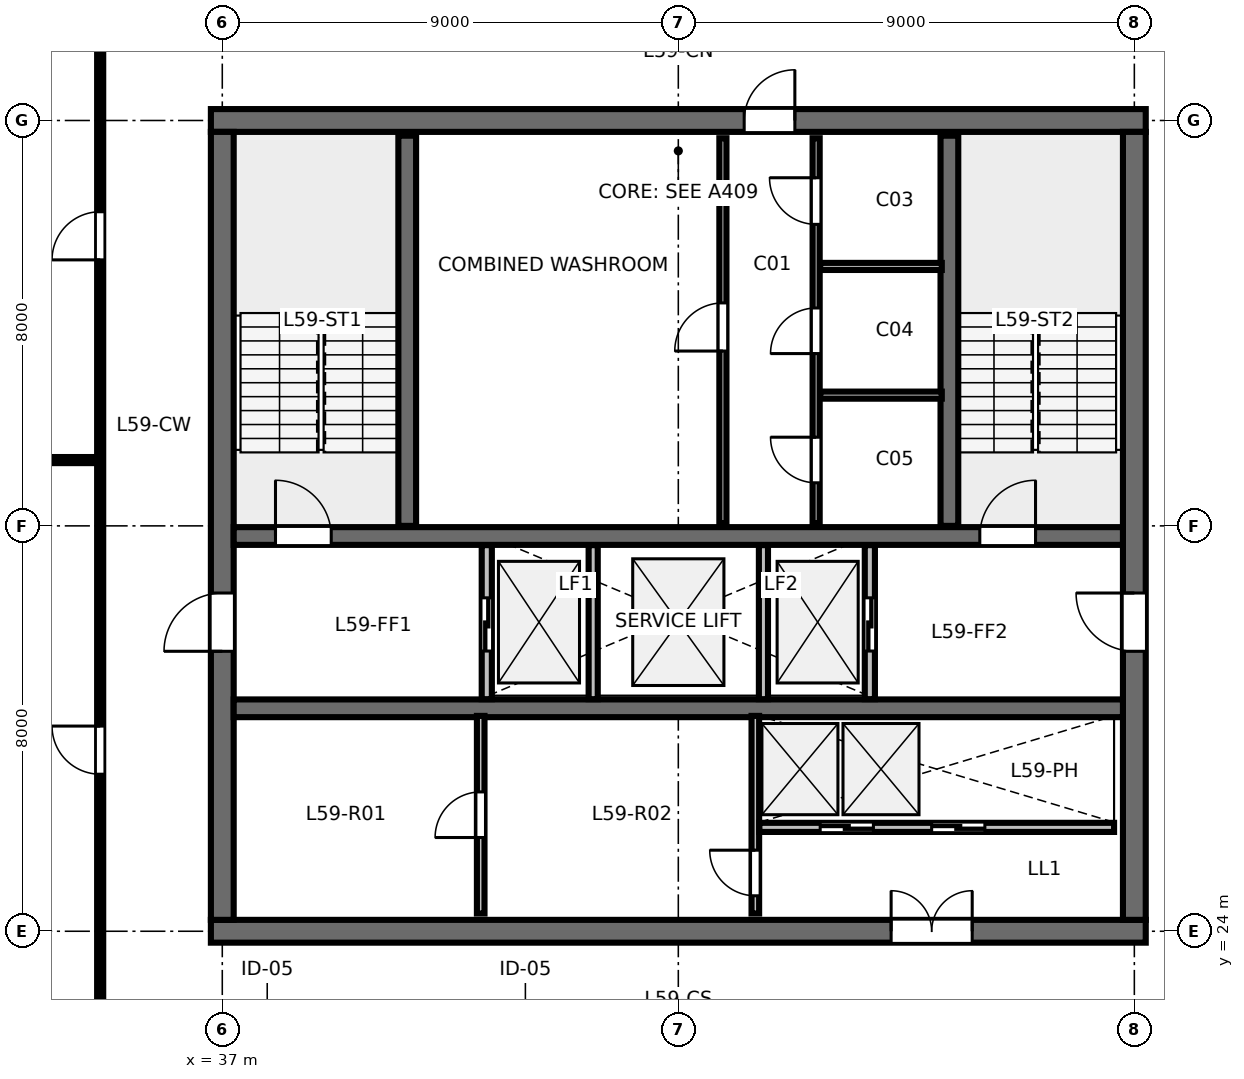
"""IFC4 building model, lengths in metres.
Left out: names, types, materials, properties, quantities, classifications, styles, units other than length and angle.
Written with IfcOpenShell. Run it as: python <this file> out.ifc"""

import sys

from ifc_helpers import new_model, si_unit, direction, frame, frame_2d, origin, place, context, subcontext, project, spatial, rectangle, extrude, element, fill, save


model = new_model("IFC4")
c1 = context("Model", 3, precision=1e-05, world=origin(), true_north=direction((0.0, 1.0)))
c2 = subcontext(c1, "Body", "Model", "MODEL_VIEW")
j1 = project(units=[si_unit("LENGTHUNIT", "METRE"), si_unit("PLANEANGLEUNIT", "RADIAN")], contexts=[c1])
p1 = place(None, origin())
s1 = spatial("IfcSite", under=j1, at=p1, CompositionType="ELEMENT")
p2 = place(p1, origin())
s2 = spatial("IfcBuilding", under=s1, at=p2, CompositionType="ELEMENT")
p3 = place(p2, frame((0.0, 0.0, 223.8)))
s3 = spatial("IfcBuildingStorey", under=s2, at=p3, CompositionType="ELEMENT", Elevation=223.8)
p4 = place(p3, frame((36.775, 24.0, 0.0), z_axis=(0.0, 0.0, 1.0), x_axis=(1.0, 0.0, 0.0)))
e1 = element("IfcWall", 1, at=p4, inside=s3, PredefinedType="SHEAR", context=c2, shape_type="SweptSolid", body=[
    extrude(rectangle(XDim=18.45, YDim=0.45, at=frame_2d((9.225, 0.0))), origin(), (0.0, 0.0, 1.0), 3.36),
])
p5 = place(p4, frame((13.425, 0.0, 0.0)))
e2 = element("IfcOpeningElement", 2, at=p5, cuts=e1, PredefinedType="OPENING", context=c2, shape_type="SweptSolid", body=[
    extrude(rectangle(XDim=1.6, YDim=2.15, at=frame_2d((0.8, 1.075))), frame((0.0, 0.235, 0.0), z_axis=(0.0, -1.0, 0.0), x_axis=(1.0, 0.0, 0.0)), (0.0, 0.0, 1.0), 0.47),
])
p6 = place(p3, frame((36.775, 40.0, 0.0), z_axis=(0.0, 0.0, 1.0), x_axis=(1.0, 0.0, 0.0)))
e3 = element("IfcWall", 3, at=p6, inside=s3, PredefinedType="SHEAR", context=c2, shape_type="SweptSolid", body=[
    extrude(rectangle(XDim=18.45, YDim=0.45, at=frame_2d((9.225, 0.0))), origin(), (0.0, 0.0, 1.0), 3.36),
])
p7 = place(p6, frame((10.525, 0.0, 0.0)))
e4 = element("IfcOpeningElement", 4, at=p7, cuts=e3, PredefinedType="OPENING", context=c2, shape_type="SweptSolid", body=[
    extrude(rectangle(XDim=1.0, YDim=2.15, at=frame_2d((0.5, 1.075))), frame((0.0, 0.235, 0.0), z_axis=(0.0, -1.0, 0.0), x_axis=(1.0, 0.0, 0.0)), (0.0, 0.0, 1.0), 0.47),
])
p8 = place(p3, frame((37.0, 24.225, 0.0), z_axis=(0.0, 0.0, 1.0), x_axis=(0.0, 1.0, 0.0)))
e5 = element("IfcWall", 5, at=p8, inside=s3, PredefinedType="SHEAR", context=c2, shape_type="SweptSolid", body=[
    extrude(rectangle(XDim=15.55, YDim=0.45, at=frame_2d((7.775, 0.0))), origin(), (0.0, 0.0, 1.0), 3.36),
])
p9 = place(p8, frame((5.3, 0.0, 0.0)))
e6 = element("IfcOpeningElement", 6, at=p9, cuts=e5, PredefinedType="OPENING", context=c2, shape_type="SweptSolid", body=[
    extrude(rectangle(XDim=1.15, YDim=2.15, at=frame_2d((0.575, 1.075))), frame((0.0, 0.235, 0.0), z_axis=(0.0, -1.0, 0.0), x_axis=(1.0, 0.0, 0.0)), (0.0, 0.0, 1.0), 0.47),
])
p10 = place(p3, frame((55.0, 24.225, 0.0), z_axis=(0.0, 0.0, 1.0), x_axis=(0.0, 1.0, 0.0)))
e7 = element("IfcWall", 7, at=p10, inside=s3, PredefinedType="SHEAR", context=c2, shape_type="SweptSolid", body=[
    extrude(rectangle(XDim=15.55, YDim=0.45, at=frame_2d((7.775, 0.0))), origin(), (0.0, 0.0, 1.0), 3.36),
])
p11 = place(p10, frame((5.3, 0.0, 0.0)))
e8 = element("IfcOpeningElement", 8, at=p11, cuts=e7, PredefinedType="OPENING", context=c2, shape_type="SweptSolid", body=[
    extrude(rectangle(XDim=1.15, YDim=2.15, at=frame_2d((0.575, 1.075))), frame((0.0, 0.235, 0.0), z_axis=(0.0, -1.0, 0.0), x_axis=(1.0, 0.0, 0.0)), (0.0, 0.0, 1.0), 0.47),
])
p12 = place(p3, frame((37.225, 31.8, 0.0), z_axis=(0.0, 0.0, 1.0), x_axis=(1.0, 0.0, 0.0)))
e9 = element("IfcWall", 9, at=p12, inside=s3, PredefinedType="SHEAR", context=c2, shape_type="SweptSolid", body=[
    extrude(rectangle(XDim=17.55, YDim=0.35, at=frame_2d((8.775, 0.0))), origin(), (0.0, 0.0, 1.0), 3.36),
])
p13 = place(p12, frame((0.825, 0.0, 0.0)))
e10 = element("IfcOpeningElement", 10, at=p13, cuts=e9, PredefinedType="OPENING", context=c2, shape_type="SweptSolid", body=[
    extrude(rectangle(XDim=1.1, YDim=2.15, at=frame_2d((0.55, 1.075))), frame((0.0, 0.185, 0.0), z_axis=(0.0, -1.0, 0.0), x_axis=(1.0, 0.0, 0.0)), (0.0, 0.0, 1.0), 0.37),
])
p14 = place(p12, frame((14.725, 0.0, 0.0)))
e11 = element("IfcOpeningElement", 11, at=p14, cuts=e9, PredefinedType="OPENING", context=c2, shape_type="SweptSolid", body=[
    extrude(rectangle(XDim=1.1, YDim=2.15, at=frame_2d((0.55, 1.075))), frame((0.0, 0.185, 0.0), z_axis=(0.0, -1.0, 0.0), x_axis=(1.0, 0.0, 0.0)), (0.0, 0.0, 1.0), 0.37),
])
p15 = place(p3, frame((37.225, 28.4, 0.0), z_axis=(0.0, 0.0, 1.0), x_axis=(1.0, 0.0, 0.0)))
e12 = element("IfcWall", 12, at=p15, inside=s3, PredefinedType="SHEAR", context=c2, shape_type="SweptSolid", body=[
    extrude(rectangle(XDim=17.55, YDim=0.35, at=frame_2d((8.775, 0.0))), origin(), (0.0, 0.0, 1.0), 3.36),
])
for number, where, z_axis, x_axis in (
    (13, (40.65, 32.0, 0.0), (0.0, 0.0, 1.0), (0.0, 1.0, 0.0)),
    (14, (51.35, 32.0, 0.0), (0.0, 0.0, 1.0), (0.0, 1.0, 0.0)),
):
    element("IfcWall", number, at=place(p3, frame(where, z_axis=z_axis, x_axis=x_axis)), inside=s3, PredefinedType="SHEAR", context=c2, shape_type="SweptSolid", body=[
        extrude(rectangle(XDim=7.7, YDim=0.35, at=frame_2d((3.85, 0.0))), origin(), (0.0, 0.0, 1.0), 3.6),
    ])
p16 = place(p3, frame((46.88, 32.05, 0.0), z_axis=(0.0, 0.0, 1.0), x_axis=(0.0, 1.0, 0.0)))
e15 = element("IfcWall", 15, at=p16, inside=s3, PredefinedType="PARTITIONING", context=c2, shape_type="SweptSolid", body=[
    extrude(rectangle(XDim=7.6, YDim=0.14, at=frame_2d((3.8, 0.0))), origin(), (0.0, 0.0, 1.0), 3.375),
])
p17 = place(p16, frame((3.4, 0.0, 0.0)))
e16 = element("IfcOpeningElement", 16, at=p17, cuts=e15, PredefinedType="OPENING", context=c2, shape_type="SweptSolid", body=[
    extrude(rectangle(XDim=0.95, YDim=2.15, at=frame_2d((0.475, 1.075))), frame((0.0, 0.08, 0.0), z_axis=(0.0, -1.0, 0.0), x_axis=(1.0, 0.0, 0.0)), (0.0, 0.0, 1.0), 0.16),
])
p18 = place(p3, frame((48.72, 32.05, 0.0), z_axis=(0.0, 0.0, 1.0), x_axis=(0.0, 1.0, 0.0)))
e17 = element("IfcWall", 17, at=p18, inside=s3, PredefinedType="PARTITIONING", context=c2, shape_type="SweptSolid", body=[
    extrude(rectangle(XDim=7.6, YDim=0.14, at=frame_2d((3.8, 0.0))), origin(), (0.0, 0.0, 1.0), 3.375),
])
p19 = place(p18, frame((0.8, 0.0, 0.0)))
e18 = element("IfcOpeningElement", 18, at=p19, cuts=e17, PredefinedType="OPENING", context=c2, shape_type="SweptSolid", body=[
    extrude(rectangle(XDim=0.9, YDim=2.15, at=frame_2d((0.45, 1.075))), frame((0.0, 0.08, 0.0), z_axis=(0.0, -1.0, 0.0), x_axis=(1.0, 0.0, 0.0)), (0.0, 0.0, 1.0), 0.16),
])
p20 = place(p18, frame((3.35, 0.0, 0.0)))
e19 = element("IfcOpeningElement", 19, at=p20, cuts=e17, PredefinedType="OPENING", context=c2, shape_type="SweptSolid", body=[
    extrude(rectangle(XDim=0.9, YDim=2.15, at=frame_2d((0.45, 1.075))), frame((0.0, 0.08, 0.0), z_axis=(0.0, -1.0, 0.0), x_axis=(1.0, 0.0, 0.0)), (0.0, 0.0, 1.0), 0.16),
])
p21 = place(p18, frame((5.9, 0.0, 0.0)))
e20 = element("IfcOpeningElement", 20, at=p21, cuts=e17, PredefinedType="OPENING", context=c2, shape_type="SweptSolid", body=[
    extrude(rectangle(XDim=0.92, YDim=2.15, at=frame_2d((0.46, 1.075))), frame((0.0, 0.08, 0.0), z_axis=(0.0, -1.0, 0.0), x_axis=(1.0, 0.0, 0.0)), (0.0, 0.0, 1.0), 0.16),
])
for number, where, z_axis, x_axis in (
    (21, (48.8, 34.58, 0.0), (0.0, 0.0, 1.0), (1.0, 0.0, 0.0)),
    (22, (48.8, 37.12, 0.0), (0.0, 0.0, 1.0), (1.0, 0.0, 0.0)),
):
    element("IfcWall", number, at=place(p3, frame(where, z_axis=z_axis, x_axis=x_axis)), inside=s3, PredefinedType="PARTITIONING", context=c2, shape_type="SweptSolid", body=[
        extrude(rectangle(XDim=2.4, YDim=0.14, at=frame_2d((1.2, 0.0))), origin(), (0.0, 0.0, 1.0), 3.375),
    ])
p22 = place(p3, frame((42.22, 28.58, 0.0), z_axis=(0.0, 0.0, 1.0), x_axis=(0.0, 1.0, 0.0)))
e23 = element("IfcWall", 23, at=p22, inside=s3, PredefinedType="PARTITIONING", context=c2, shape_type="SweptSolid", body=[
    extrude(rectangle(XDim=3.04, YDim=0.2, at=frame_2d((1.52, 0.0))), origin(), (0.0, 0.0, 1.0), 3.375),
])
p23 = place(p22, frame((0.95, 0.0, 0.0)))
e24 = element("IfcOpeningElement", 24, at=p23, cuts=e23, PredefinedType="OPENING", context=c2, shape_type="SweptSolid", body=[
    extrude(rectangle(XDim=1.05, YDim=2.15, at=frame_2d((0.525, 1.075))), frame((0.0, 0.11, 0.0), z_axis=(0.0, -1.0, 0.0), x_axis=(1.0, 0.0, 0.0)), (0.0, 0.0, 1.0), 0.22),
])
p24 = place(p3, frame((49.78, 28.58, 0.0), z_axis=(0.0, 0.0, 1.0), x_axis=(0.0, 1.0, 0.0)))
e25 = element("IfcWall", 25, at=p24, inside=s3, PredefinedType="PARTITIONING", context=c2, shape_type="SweptSolid", body=[
    extrude(rectangle(XDim=3.04, YDim=0.2, at=frame_2d((1.52, 0.0))), origin(), (0.0, 0.0, 1.0), 3.375),
])
p25 = place(p24, frame((0.95, 0.0, 0.0)))
e26 = element("IfcOpeningElement", 26, at=p25, cuts=e25, PredefinedType="OPENING", context=c2, shape_type="SweptSolid", body=[
    extrude(rectangle(XDim=1.05, YDim=2.15, at=frame_2d((0.525, 1.075))), frame((0.0, 0.11, 0.0), z_axis=(0.0, -1.0, 0.0), x_axis=(1.0, 0.0, 0.0)), (0.0, 0.0, 1.0), 0.22),
])
for number, where, z_axis, x_axis in (
    (27, (44.32, 28.58, 0.0), (0.0, 0.0, 1.0), (0.0, 1.0, 0.0)),
    (28, (47.68, 28.58, 0.0), (0.0, 0.0, 1.0), (0.0, 1.0, 0.0)),
):
    element("IfcWall", number, at=place(p3, frame(where, z_axis=z_axis, x_axis=x_axis)), inside=s3, PredefinedType="PARTITIONING", context=c2, shape_type="SweptSolid", body=[
        extrude(rectangle(XDim=3.04, YDim=0.18, at=frame_2d((1.52, 0.0))), origin(), (0.0, 0.0, 1.0), 3.375),
    ])
p26 = place(p3, frame((42.1, 24.35, 0.0), z_axis=(0.0, 0.0, 1.0), x_axis=(0.0, 1.0, 0.0)))
e29 = element("IfcWall", 29, at=p26, inside=s3, PredefinedType="PARTITIONING", context=c2, shape_type="SweptSolid", body=[
    extrude(rectangle(XDim=3.9, YDim=0.15, at=frame_2d((1.95, 0.0))), origin(), (0.0, 0.0, 1.0), 3.375),
])
p27 = place(p26, frame((1.5, 0.0, 0.0)))
e30 = element("IfcOpeningElement", 30, at=p27, cuts=e29, PredefinedType="OPENING", context=c2, shape_type="SweptSolid", body=[
    extrude(rectangle(XDim=0.9, YDim=2.15, at=frame_2d((0.45, 1.075))), frame((0.0, 0.085, 0.0), z_axis=(0.0, -1.0, 0.0), x_axis=(1.0, 0.0, 0.0)), (0.0, 0.0, 1.0), 0.17),
])
p28 = place(p3, frame((47.52, 24.35, 0.0), z_axis=(0.0, 0.0, 1.0), x_axis=(0.0, 1.0, 0.0)))
e31 = element("IfcWall", 31, at=p28, inside=s3, PredefinedType="PARTITIONING", context=c2, shape_type="SweptSolid", body=[
    extrude(rectangle(XDim=3.9, YDim=0.15, at=frame_2d((1.95, 0.0))), origin(), (0.0, 0.0, 1.0), 3.375),
])
p29 = place(p28, frame((0.35, 0.0, 0.0)))
e32 = element("IfcOpeningElement", 32, at=p29, cuts=e31, PredefinedType="OPENING", context=c2, shape_type="SweptSolid", body=[
    extrude(rectangle(XDim=0.9, YDim=2.15, at=frame_2d((0.45, 1.075))), frame((0.0, 0.085, 0.0), z_axis=(0.0, -1.0, 0.0), x_axis=(1.0, 0.0, 0.0)), (0.0, 0.0, 1.0), 0.17),
])
p30 = place(p3, frame((47.6, 26.05, 0.0), z_axis=(0.0, 0.0, 1.0), x_axis=(1.0, 0.0, 0.0)))
e33 = element("IfcWall", 33, at=p30, inside=s3, PredefinedType="PARTITIONING", context=c2, shape_type="SweptSolid", body=[
    extrude(rectangle(XDim=7.0, YDim=0.18, at=frame_2d((3.5, 0.0))), origin(), (0.0, 0.0, 1.0), 3.375),
])
p31 = place(p30, frame((1.2, 0.0, 0.0)))
e34 = element("IfcOpeningElement", 34, at=p31, cuts=e33, PredefinedType="OPENING", context=c2, shape_type="SweptSolid", body=[
    extrude(rectangle(XDim=1.05, YDim=2.15, at=frame_2d((0.525, 1.075))), frame((0.0, 0.1, 0.0), z_axis=(0.0, -1.0, 0.0), x_axis=(1.0, 0.0, 0.0)), (0.0, 0.0, 1.0), 0.2),
])
p32 = place(p30, frame((3.4, 0.0, 0.0)))
e35 = element("IfcOpeningElement", 35, at=p32, cuts=e33, PredefinedType="OPENING", context=c2, shape_type="SweptSolid", body=[
    extrude(rectangle(XDim=1.05, YDim=2.15, at=frame_2d((0.525, 1.075))), frame((0.0, 0.1, 0.0), z_axis=(0.0, -1.0, 0.0), x_axis=(1.0, 0.0, 0.0)), (0.0, 0.0, 1.0), 0.2),
])
p33 = place(p3, frame((34.59, 33.299, 0.0), z_axis=(0.0, 0.0, 1.0), x_axis=(-1.0, 0.0, 0.0)))
e36 = element("IfcWall", 36, at=p33, inside=s3, PredefinedType="PARTITIONING", context=c2, shape_type="SweptSolid", body=[
    extrude(rectangle(XDim=8.183, YDim=0.12, at=frame_2d((4.091, 0.0))), origin(), (0.0, 0.0, 1.0), 2.655),
])
p34 = place(p33, frame((1.4, 0.0, 0.0)))
e37 = element("IfcOpeningElement", 37, at=p34, cuts=e36, PredefinedType="OPENING", context=c2, shape_type="SweptSolid", body=[
    extrude(rectangle(XDim=0.9, YDim=2.15, at=frame_2d((0.45, 1.075))), frame((0.0, 0.07, 0.0), z_axis=(0.0, -1.0, 0.0), x_axis=(1.0, 0.0, 0.0)), (0.0, 0.0, 1.0), 0.14),
])
p35 = place(p3, frame((34.59, 21.65, 0.0), z_axis=(0.0, 0.0, 1.0), x_axis=(0.0, 1.0, 0.0)))
e38 = element("IfcWall", 38, at=p35, inside=s3, PredefinedType="PARTITIONING", context=c2, shape_type="SweptSolid", body=[
    extrude(rectangle(XDim=20.7, YDim=0.12, at=frame_2d((10.35, 0.0))), origin(), (0.0, 0.0, 1.0), 2.655),
])
p36 = place(p35, frame((5.449, 0.0, 0.0)))
e39 = element("IfcOpeningElement", 39, at=p36, cuts=e38, PredefinedType="OPENING", context=c2, shape_type="SweptSolid", body=[
    extrude(rectangle(XDim=0.95, YDim=2.15, at=frame_2d((0.475, 1.075))), frame((0.0, 0.07, 0.0), z_axis=(0.0, -1.0, 0.0), x_axis=(1.0, 0.0, 0.0)), (0.0, 0.0, 1.0), 0.14),
])
p37 = place(p35, frame((15.599, 0.0, 0.0)))
e40 = element("IfcOpeningElement", 40, at=p37, cuts=e38, PredefinedType="OPENING", context=c2, shape_type="SweptSolid", body=[
    extrude(rectangle(XDim=0.95, YDim=2.15, at=frame_2d((0.475, 1.075))), frame((0.0, 0.07, 0.0), z_axis=(0.0, -1.0, 0.0), x_axis=(1.0, 0.0, 0.0)), (0.0, 0.0, 1.0), 0.14),
])
p38 = place(p13, origin())
e41 = element("IfcDoor", 41, at=p38, inside=s3, OperationType="SINGLE_SWING_LEFT", PredefinedType="DOOR", context=c2, shape_type="SweptSolid", body=[
    extrude(rectangle(XDim=1.1, YDim=2.15, at=frame_2d((0.55, 1.075))), frame((0.0, 0.025, 0.0), z_axis=(0.0, -1.0, 0.0), x_axis=(1.0, 0.0, 0.0)), (0.0, 0.0, 1.0), 0.05),
])
fill(e10, e41)
p39 = place(p14, origin())
e42 = element("IfcDoor", 42, at=p39, inside=s3, OperationType="SINGLE_SWING_RIGHT", PredefinedType="DOOR", context=c2, shape_type="SweptSolid", body=[
    extrude(rectangle(XDim=1.1, YDim=2.15, at=frame_2d((0.55, 1.075))), frame((0.0, 0.025, 0.0), z_axis=(0.0, -1.0, 0.0), x_axis=(1.0, 0.0, 0.0)), (0.0, 0.0, 1.0), 0.05),
])
fill(e11, e42)
p40 = place(p7, origin())
e43 = element("IfcDoor", 43, at=p40, inside=s3, OperationType="SINGLE_SWING_RIGHT", PredefinedType="DOOR", context=c2, shape_type="SweptSolid", body=[
    extrude(rectangle(XDim=1.0, YDim=2.15, at=frame_2d((0.5, 1.075))), frame((0.0, 0.025, 0.0), z_axis=(0.0, -1.0, 0.0), x_axis=(1.0, 0.0, 0.0)), (0.0, 0.0, 1.0), 0.05),
])
fill(e4, e43)
p41 = place(p9, origin())
e44 = element("IfcDoor", 44, at=p41, inside=s3, OperationType="SINGLE_SWING_LEFT", PredefinedType="DOOR", context=c2, shape_type="SweptSolid", body=[
    extrude(rectangle(XDim=1.15, YDim=2.15, at=frame_2d((0.575, 1.075))), frame((0.0, 0.025, 0.0), z_axis=(0.0, -1.0, 0.0), x_axis=(1.0, 0.0, 0.0)), (0.0, 0.0, 1.0), 0.05),
])
fill(e6, e44)
p42 = place(p11, origin())
e45 = element("IfcDoor", 45, at=p42, inside=s3, OperationType="SINGLE_SWING_RIGHT", PredefinedType="DOOR", context=c2, shape_type="SweptSolid", body=[
    extrude(rectangle(XDim=1.15, YDim=2.15, at=frame_2d((0.575, 1.075))), frame((0.0, 0.025, 0.0), z_axis=(0.0, -1.0, 0.0), x_axis=(1.0, 0.0, 0.0)), (0.0, 0.0, 1.0), 0.05),
])
fill(e8, e45)
p43 = place(p5, origin())
e46 = element("IfcDoor", 46, at=p43, inside=s3, OperationType="DOUBLE_DOOR_SINGLE_SWING", PredefinedType="DOOR", context=c2, shape_type="SweptSolid", body=[
    extrude(rectangle(XDim=1.6, YDim=2.15, at=frame_2d((0.8, 1.075))), frame((0.0, 0.025, 0.0), z_axis=(0.0, -1.0, 0.0), x_axis=(1.0, 0.0, 0.0)), (0.0, 0.0, 1.0), 0.05),
])
fill(e2, e46)
p44 = place(p17, origin())
e47 = element("IfcDoor", 47, at=p44, inside=s3, OperationType="SINGLE_SWING_LEFT", PredefinedType="DOOR", context=c2, shape_type="SweptSolid", body=[
    extrude(rectangle(XDim=0.95, YDim=2.15, at=frame_2d((0.475, 1.075))), frame((0.0, 0.025, 0.0), z_axis=(0.0, -1.0, 0.0), x_axis=(1.0, 0.0, 0.0)), (0.0, 0.0, 1.0), 0.05),
])
fill(e16, e47)
p45 = place(p19, origin())
e48 = element("IfcDoor", 48, at=p45, inside=s3, OperationType="SINGLE_SWING_RIGHT", PredefinedType="DOOR", context=c2, shape_type="SweptSolid", body=[
    extrude(rectangle(XDim=0.9, YDim=2.15, at=frame_2d((0.45, 1.075))), frame((0.0, 0.025, 0.0), z_axis=(0.0, -1.0, 0.0), x_axis=(1.0, 0.0, 0.0)), (0.0, 0.0, 1.0), 0.05),
])
fill(e18, e48)
p46 = place(p20, origin())
e49 = element("IfcDoor", 49, at=p46, inside=s3, OperationType="SINGLE_SWING_LEFT", PredefinedType="DOOR", context=c2, shape_type="SweptSolid", body=[
    extrude(rectangle(XDim=0.9, YDim=2.15, at=frame_2d((0.45, 1.075))), frame((0.0, 0.025, 0.0), z_axis=(0.0, -1.0, 0.0), x_axis=(1.0, 0.0, 0.0)), (0.0, 0.0, 1.0), 0.05),
])
fill(e19, e49)
p47 = place(p21, origin())
e50 = element("IfcDoor", 50, at=p47, inside=s3, OperationType="SINGLE_SWING_RIGHT", PredefinedType="DOOR", context=c2, shape_type="SweptSolid", body=[
    extrude(rectangle(XDim=0.92, YDim=2.15, at=frame_2d((0.46, 1.075))), frame((0.0, 0.025, 0.0), z_axis=(0.0, -1.0, 0.0), x_axis=(1.0, 0.0, 0.0)), (0.0, 0.0, 1.0), 0.05),
])
fill(e20, e50)
p48 = place(p23, origin())
e51 = element("IfcDoor", 51, at=p48, inside=s3, OperationType="SLIDING_TO_LEFT", PredefinedType="DOOR", context=c2, shape_type="SweptSolid", body=[
    extrude(rectangle(XDim=1.05, YDim=2.15, at=frame_2d((0.525, 1.075))), frame((0.0, 0.025, 0.0), z_axis=(0.0, -1.0, 0.0), x_axis=(1.0, 0.0, 0.0)), (0.0, 0.0, 1.0), 0.05),
])
fill(e24, e51)
p49 = place(p25, origin())
e52 = element("IfcDoor", 52, at=p49, inside=s3, OperationType="SLIDING_TO_RIGHT", PredefinedType="DOOR", context=c2, shape_type="SweptSolid", body=[
    extrude(rectangle(XDim=1.05, YDim=2.15, at=frame_2d((0.525, 1.075))), frame((0.0, 0.025, 0.0), z_axis=(0.0, -1.0, 0.0), x_axis=(1.0, 0.0, 0.0)), (0.0, 0.0, 1.0), 0.05),
])
fill(e26, e52)
p50 = place(p27, origin())
e53 = element("IfcDoor", 53, at=p50, inside=s3, OperationType="SINGLE_SWING_LEFT", PredefinedType="DOOR", context=c2, shape_type="SweptSolid", body=[
    extrude(rectangle(XDim=0.9, YDim=2.15, at=frame_2d((0.45, 1.075))), frame((0.0, 0.025, 0.0), z_axis=(0.0, -1.0, 0.0), x_axis=(1.0, 0.0, 0.0)), (0.0, 0.0, 1.0), 0.05),
])
fill(e30, e53)
p51 = place(p29, origin())
e54 = element("IfcDoor", 54, at=p51, inside=s3, OperationType="SINGLE_SWING_RIGHT", PredefinedType="DOOR", context=c2, shape_type="SweptSolid", body=[
    extrude(rectangle(XDim=0.9, YDim=2.15, at=frame_2d((0.45, 1.075))), frame((0.0, 0.025, 0.0), z_axis=(0.0, -1.0, 0.0), x_axis=(1.0, 0.0, 0.0)), (0.0, 0.0, 1.0), 0.05),
])
fill(e32, e54)
p52 = place(p31, origin())
e55 = element("IfcDoor", 55, at=p52, inside=s3, OperationType="SLIDING_TO_LEFT", PredefinedType="DOOR", context=c2, shape_type="SweptSolid", body=[
    extrude(rectangle(XDim=1.05, YDim=2.15, at=frame_2d((0.525, 1.075))), frame((0.0, 0.025, 0.0), z_axis=(0.0, -1.0, 0.0), x_axis=(1.0, 0.0, 0.0)), (0.0, 0.0, 1.0), 0.05),
])
fill(e34, e55)
p53 = place(p32, origin())
e56 = element("IfcDoor", 56, at=p53, inside=s3, OperationType="SLIDING_TO_RIGHT", PredefinedType="DOOR", context=c2, shape_type="SweptSolid", body=[
    extrude(rectangle(XDim=1.05, YDim=2.15, at=frame_2d((0.525, 1.075))), frame((0.0, 0.025, 0.0), z_axis=(0.0, -1.0, 0.0), x_axis=(1.0, 0.0, 0.0)), (0.0, 0.0, 1.0), 0.05),
])
fill(e35, e56)
p54 = place(p36, origin())
e57 = element("IfcDoor", 57, at=p54, inside=s3, OperationType="SINGLE_SWING_RIGHT", PredefinedType="DOOR", context=c2, shape_type="SweptSolid", body=[
    extrude(rectangle(XDim=0.95, YDim=2.15, at=frame_2d((0.475, 1.075))), frame((0.0, 0.025, 0.0), z_axis=(0.0, -1.0, 0.0), x_axis=(1.0, 0.0, 0.0)), (0.0, 0.0, 1.0), 0.05),
])
fill(e39, e57)
p55 = place(p37, origin())
e58 = element("IfcDoor", 58, at=p55, inside=s3, OperationType="SINGLE_SWING_LEFT", PredefinedType="DOOR", context=c2, shape_type="SweptSolid", body=[
    extrude(rectangle(XDim=0.95, YDim=2.15, at=frame_2d((0.475, 1.075))), frame((0.0, 0.025, 0.0), z_axis=(0.0, -1.0, 0.0), x_axis=(1.0, 0.0, 0.0)), (0.0, 0.0, 1.0), 0.05),
])
fill(e40, e58)
save(model, sys.argv[1])
